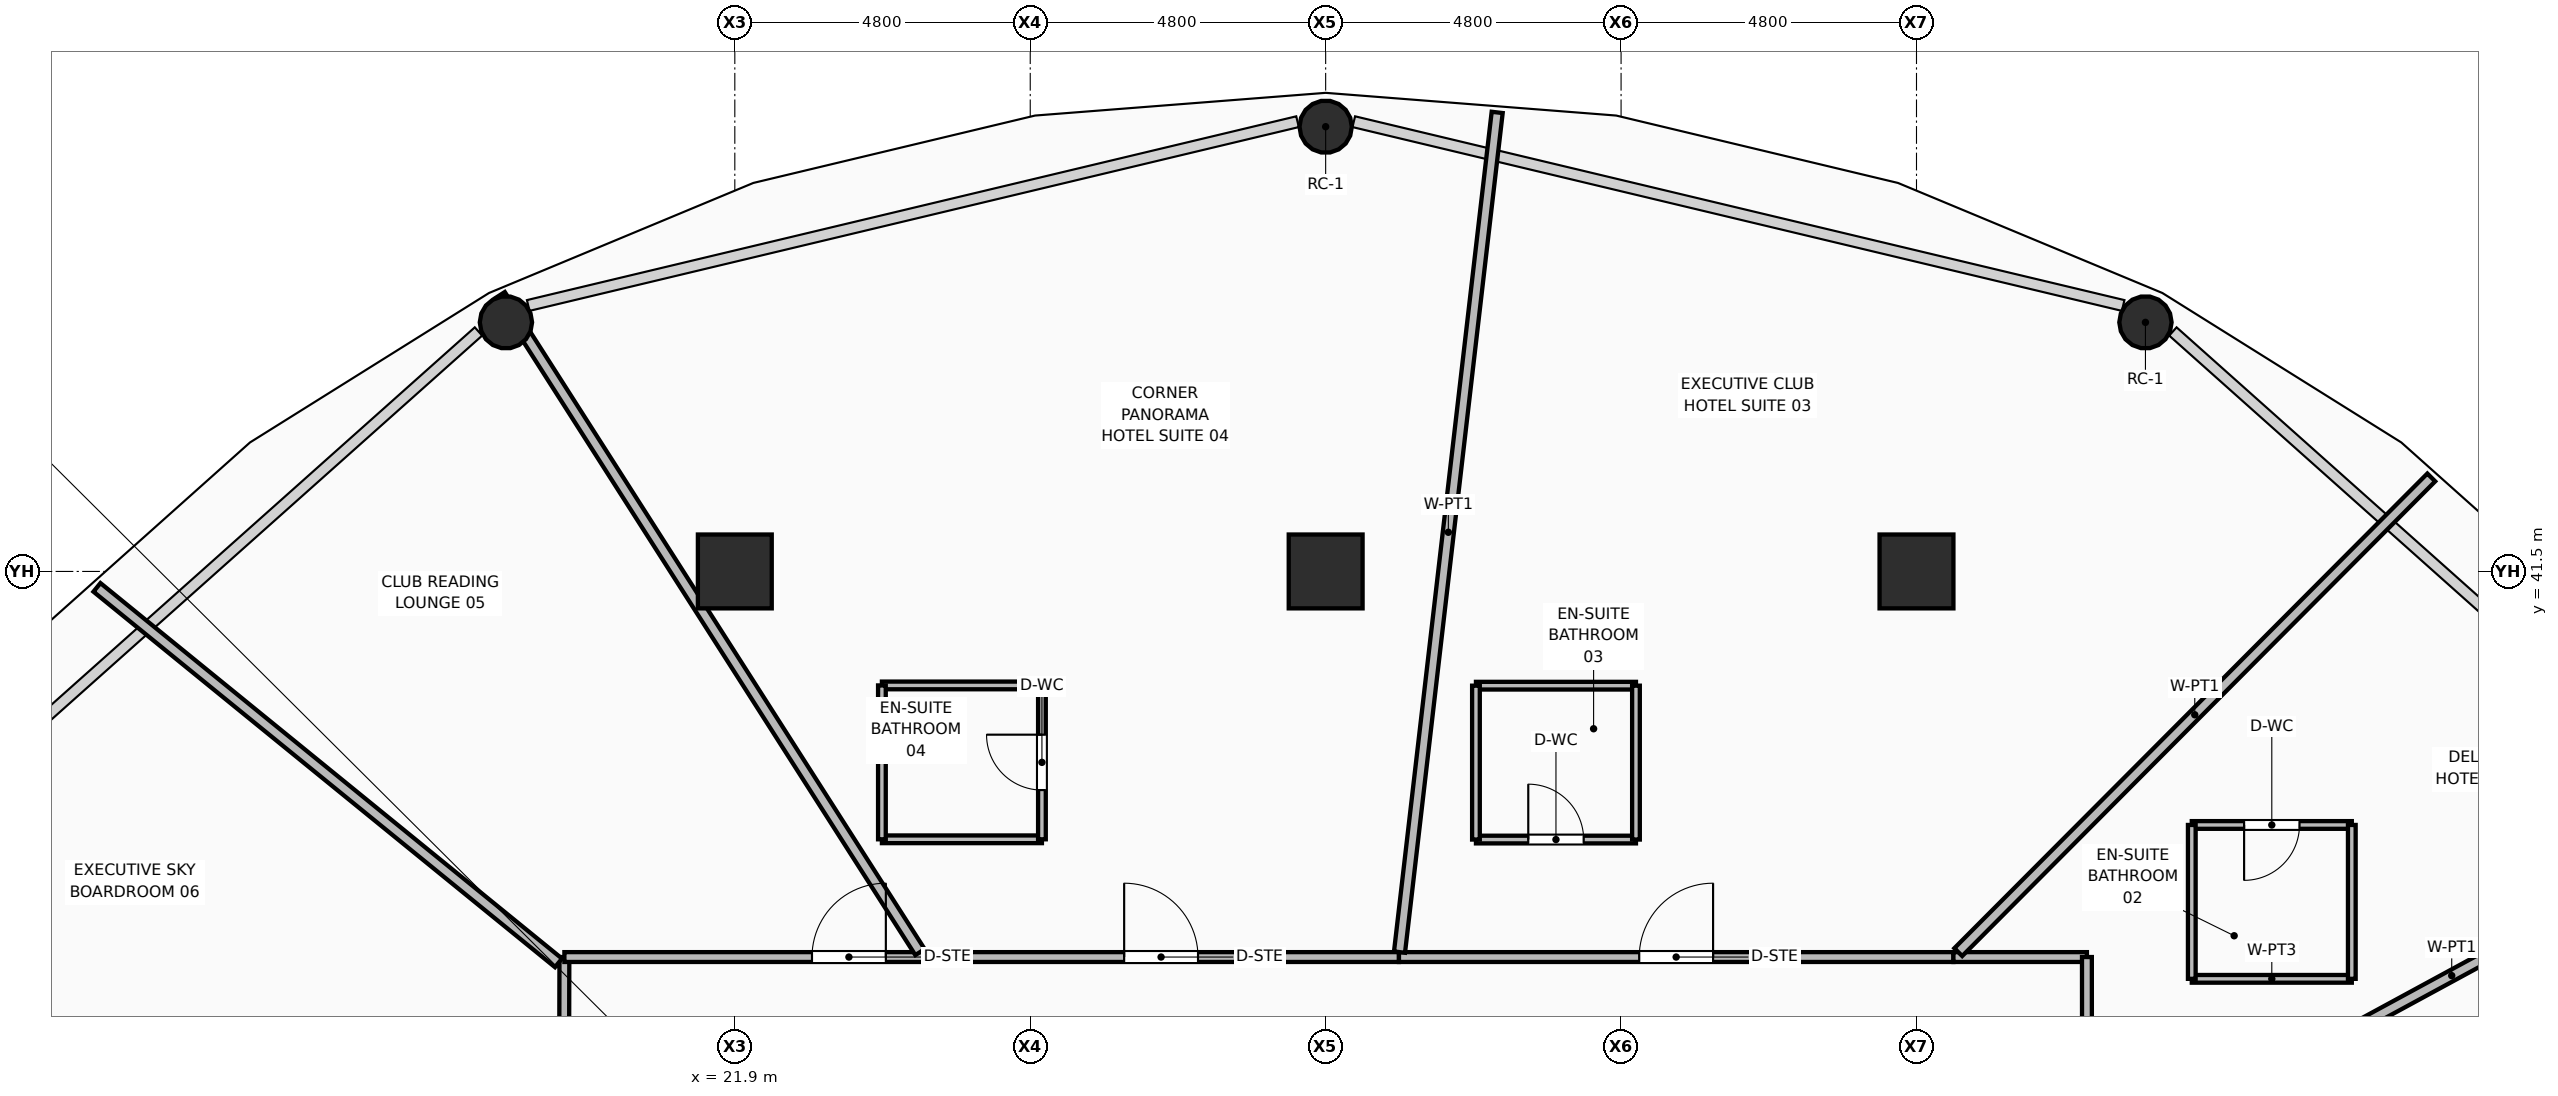
"""IFC4 building model, lengths in metres.
Left out: names, types, materials, properties, quantities, classifications, styles, units other than length and angle.
Written with IfcOpenShell. Run it as: python <this file> out.ifc"""

import sys

from ifc_helpers import new_model, si_unit, direction, frame, frame_2d, origin, origin_2d, place, context, subcontext, project, spatial, rectangle, hollow_rectangle, hollow_circle, extrude, element, fill, save


model = new_model("IFC4")
c1 = context("Model", 3, precision=1e-05, world=origin(), true_north=direction((0.0, 1.0)))
c2 = subcontext(c1, "Body", "Model", "MODEL_VIEW")
j1 = project(units=[si_unit("LENGTHUNIT", "METRE"), si_unit("PLANEANGLEUNIT", "RADIAN")], contexts=[c1])
p1 = place(None, origin())
s1 = spatial("IfcSite", under=j1, at=p1, CompositionType="ELEMENT")
p2 = place(p1, origin())
s2 = spatial("IfcBuilding", under=s1, at=p2, CompositionType="ELEMENT")
p3 = place(p2, frame((0.0, 0.0, 49.5)))
s3 = spatial("IfcBuildingStorey", under=s2, at=p3, CompositionType="ELEMENT", Elevation=49.5)
for number, where, z_axis, x_axis in (
    (1, (21.9, 41.5, 0.0), (0.0, 0.0, 1.0), (1.0, 0.0, 0.0)),
    (2, (31.5, 41.5, 0.0), (0.0, 0.0, 1.0), (1.0, 0.0, 0.0)),
    (3, (41.1, 41.5, 0.0), (0.0, 0.0, 1.0), (1.0, 0.0, 0.0)),
):
    element("IfcColumn", number, at=place(p3, frame(where, z_axis=z_axis, x_axis=x_axis)), inside=s3, PredefinedType="COLUMN", context=c2, shape_type="SweptSolid", body=[
        extrude(hollow_rectangle(XDim=1.2, YDim=1.2, WallThickness=0.045, at=origin_2d()), origin(), (0.0, 0.0, 1.0), 3.75),
    ])
for number, where, z_axis, x_axis in (
    (4, (44.82, 45.547, 0.0), (0.0, 0.0, 1.0), (1.0, 0.0, 0.0)),
    (5, (31.5, 48.726, 0.0), (0.0, 0.0, 1.0), (1.0, 0.0, 0.0)),
    (6, (18.181, 45.547, 0.0), (0.0, 0.0, 1.0), (1.0, 0.0, 0.0)),
):
    element("IfcColumn", number, at=place(p3, frame(where, z_axis=z_axis, x_axis=x_axis)), inside=s3, PredefinedType="COLUMN", context=c2, shape_type="SweptSolid", body=[
        extrude(hollow_circle(Radius=0.425, WallThickness=0.04, at=origin_2d()), origin(), (0.0, 0.0, 1.0), 3.57),
    ])
p4 = place(p3, frame((19.119, 29.98, 0.0), z_axis=(0.0, 0.0, 1.0), x_axis=(0.002322874105, 0.999997302124, 0.0)))
e7 = element("IfcWall", 7, at=p4, inside=s3, PredefinedType="PARTITIONING", context=c2, shape_type="SweptSolid", body=[
    extrude(rectangle(XDim=5.255, YDim=0.16, at=frame_2d((2.627, 0.0))), origin(), (0.0, 0.0, 1.0), 2.928),
])
p5 = place(p4, frame((0.608, 0.0, 0.0)))
e8 = element("IfcOpeningElement", 8, at=p5, cuts=e7, PredefinedType="OPENING", context=c2, shape_type="SweptSolid", body=[
    extrude(rectangle(XDim=1.2, YDim=2.1, at=frame_2d((0.6, 1.05))), frame((0.0, 0.09, 0.0), z_axis=(0.0, -1.0, 0.0), x_axis=(1.0, 0.0, 0.0)), (0.0, 0.0, 1.0), 0.18),
])
p6 = place(p3, frame((19.131, 35.235, 0.0), z_axis=(0.0, 0.0, 1.0), x_axis=(1.0, 0.0, 0.0)))
e9 = element("IfcWall", 9, at=p6, inside=s3, PredefinedType="PARTITIONING", context=c2, shape_type="SweptSolid", body=[
    extrude(rectangle(XDim=5.829, YDim=0.16, at=frame_2d((2.915, 0.0))), origin(), (0.0, 0.0, 1.0), 2.928),
])
p7 = place(p6, frame((4.023, 0.0, 0.0)))
e10 = element("IfcOpeningElement", 10, at=p7, cuts=e9, PredefinedType="OPENING", context=c2, shape_type="SweptSolid", body=[
    extrude(rectangle(XDim=1.2, YDim=2.1, at=frame_2d((0.6, 1.05))), frame((0.0, 0.09, 0.0), z_axis=(0.0, -1.0, 0.0), x_axis=(1.0, 0.0, 0.0)), (0.0, 0.0, 1.0), 0.18),
])
p8 = place(p3, frame((24.96, 35.235, 0.0), z_axis=(0.0, 0.0, 1.0), x_axis=(1.0, 0.0, 0.0)))
e11 = element("IfcWall", 11, at=p8, inside=s3, PredefinedType="PARTITIONING", context=c2, shape_type="SweptSolid", body=[
    extrude(rectangle(XDim=7.731, YDim=0.16, at=frame_2d((3.865, 0.0))), origin(), (0.0, 0.0, 1.0), 2.928),
])
p9 = place(p8, frame((3.266, 0.0, 0.0)))
e12 = element("IfcOpeningElement", 12, at=p9, cuts=e11, PredefinedType="OPENING", context=c2, shape_type="SweptSolid", body=[
    extrude(rectangle(XDim=1.2, YDim=2.1, at=frame_2d((0.6, 1.05))), frame((0.0, 0.09, 0.0), z_axis=(0.0, -1.0, 0.0), x_axis=(1.0, 0.0, 0.0)), (0.0, 0.0, 1.0), 0.18),
])
p10 = place(p3, frame((32.691, 35.235, 0.0), z_axis=(0.0, 0.0, 1.0), x_axis=(1.0, 0.0, 0.0)))
e13 = element("IfcWall", 13, at=p10, inside=s3, PredefinedType="PARTITIONING", context=c2, shape_type="SweptSolid", body=[
    extrude(rectangle(XDim=9.009, YDim=0.16, at=frame_2d((4.504, 0.0))), origin(), (0.0, 0.0, 1.0), 2.928),
])
p11 = place(p10, frame((3.904, 0.0, 0.0)))
e14 = element("IfcOpeningElement", 14, at=p11, cuts=e13, PredefinedType="OPENING", context=c2, shape_type="SweptSolid", body=[
    extrude(rectangle(XDim=1.2, YDim=2.1, at=frame_2d((0.6, 1.05))), frame((0.0, 0.09, 0.0), z_axis=(0.0, -1.0, 0.0), x_axis=(1.0, 0.0, 0.0)), (0.0, 0.0, 1.0), 0.18),
])
p12 = place(p3, frame((41.7, 35.235, 0.0), z_axis=(0.0, 0.0, 1.0), x_axis=(1.0, 0.0, 0.0)))
e15 = element("IfcWall", 15, at=p12, inside=s3, PredefinedType="PARTITIONING", context=c2, shape_type="SweptSolid", body=[
    extrude(rectangle(XDim=2.169, YDim=0.16, at=frame_2d((1.084, 0.0))), origin(), (0.0, 0.0, 1.0), 2.928),
])
p13 = place(p3, frame((43.869, 35.235, 0.0), z_axis=(0.0, 0.0, 1.0), x_axis=(0.00062439283, -0.999999805067, 0.0)))
e16 = element("IfcWall", 16, at=p13, inside=s3, PredefinedType="PARTITIONING", context=c2, shape_type="SweptSolid", body=[
    extrude(rectangle(XDim=3.519, YDim=0.16, at=frame_2d((1.76, 0.0))), origin(), (0.0, 0.0, 1.0), 2.928),
])
p14 = place(p13, frame((1.919, 0.0, 0.0)))
e17 = element("IfcOpeningElement", 17, at=p14, cuts=e16, PredefinedType="OPENING", context=c2, shape_type="SweptSolid", body=[
    extrude(rectangle(XDim=1.0, YDim=2.1, at=frame_2d((0.5, 1.05))), frame((0.0, 0.09, 0.0), z_axis=(0.0, -1.0, 0.0), x_axis=(1.0, 0.0, 0.0)), (0.0, 0.0, 1.0), 0.18),
])
p15 = place(p3, frame((43.965, 31.767, 0.0), z_axis=(0.0, 0.0, 1.0), x_axis=(0.878834340918, 0.477127028393, 0.0)))
e18 = element("IfcWall", 18, at=p15, inside=s3, PredefinedType="PARTITIONING", context=c2, shape_type="SweptSolid", body=[
    extrude(rectangle(XDim=12.104, YDim=0.18, at=frame_2d((6.052, 0.0))), origin(), (0.0, 0.0, 1.0), 2.775),
])
p16 = place(p3, frame((41.779, 35.315, 0.0), z_axis=(0.0, 0.0, 1.0), x_axis=(0.705861156653, 0.708350215309, 0.0)))
e19 = element("IfcWall", 19, at=p16, inside=s3, PredefinedType="PARTITIONING", context=c2, shape_type="SweptSolid", body=[
    extrude(rectangle(XDim=10.887, YDim=0.18, at=frame_2d((5.444, 0.0))), origin(), (0.0, 0.0, 1.0), 2.775),
])
p17 = place(p3, frame((32.7, 35.315, 0.0), z_axis=(0.0, 0.0, 1.0), x_axis=(0.115555102972, 0.993301071265, 0.0)))
e20 = element("IfcWall", 20, at=p17, inside=s3, PredefinedType="PARTITIONING", context=c2, shape_type="SweptSolid", body=[
    extrude(rectangle(XDim=13.735, YDim=0.18, at=frame_2d((6.868, 0.0))), origin(), (0.0, 0.0, 1.0), 2.775),
])
p18 = place(p3, frame((24.909, 35.315, 0.0), z_axis=(0.0, 0.0, 1.0), x_axis=(-0.538458076676, 0.842652300574, 0.0)))
e21 = element("IfcWall", 21, at=p18, inside=s3, PredefinedType="PARTITIONING", context=c2, shape_type="SweptSolid", body=[
    extrude(rectangle(XDim=12.669, YDim=0.18, at=frame_2d((6.335, 0.0))), origin(), (0.0, 0.0, 1.0), 2.775),
])
p19 = place(p3, frame((19.035, 35.14, 0.0), z_axis=(0.0, 0.0, 1.0), x_axis=(-0.77570287791, 0.631098284899, 0.0)))
e22 = element("IfcWall", 22, at=p19, inside=s3, PredefinedType="PARTITIONING", context=c2, shape_type="SweptSolid", body=[
    extrude(rectangle(XDim=9.667, YDim=0.18, at=frame_2d((4.834, 0.0))), origin(), (0.0, 0.0, 1.0), 2.775),
])
p20 = place(p3, frame((19.035, 30.014, 0.0), z_axis=(0.0, 0.0, 1.0), x_axis=(-0.927750435419, 0.373201191827, 0.0)))
e23 = element("IfcWall", 23, at=p20, inside=s3, PredefinedType="PARTITIONING", context=c2, shape_type="SweptSolid", body=[
    extrude(rectangle(XDim=13.084, YDim=0.18, at=frame_2d((6.542, 0.0))), origin(), (0.0, 0.0, 1.0), 2.775),
])
p21 = place(p3, frame((45.573, 34.881, 0.0), z_axis=(0.0, 0.0, 1.0), x_axis=(1.0, 0.0, 0.0)))
e24 = element("IfcWall", 24, at=p21, inside=s3, PredefinedType="PARTITIONING", context=c2, shape_type="SweptSolid", body=[
    extrude(rectangle(XDim=2.6, YDim=0.125, at=frame_2d((1.3, 0.0))), origin(), (0.0, 0.0, 1.0), 2.928),
])
p22 = place(p3, frame((45.573, 37.381, 0.0), z_axis=(0.0, 0.0, 1.0), x_axis=(1.0, 0.0, 0.0)))
e25 = element("IfcWall", 25, at=p22, inside=s3, PredefinedType="PARTITIONING", context=c2, shape_type="SweptSolid", body=[
    extrude(rectangle(XDim=2.6, YDim=0.125, at=frame_2d((1.3, 0.0))), origin(), (0.0, 0.0, 1.0), 3.55),
])
p23 = place(p22, frame((0.85, 0.0, 0.0)))
e26 = element("IfcOpeningElement", 26, at=p23, cuts=e25, PredefinedType="OPENING", context=c2, shape_type="SweptSolid", body=[
    extrude(rectangle(XDim=0.9, YDim=2.1, at=frame_2d((0.45, 1.05))), frame((0.0, 0.073, 0.0), z_axis=(0.0, -1.0, 0.0), x_axis=(1.0, 0.0, 0.0)), (0.0, 0.0, 1.0), 0.145),
])
p24 = place(p3, frame((45.573, 34.881, 0.0), z_axis=(0.0, 0.0, 1.0), x_axis=(0.0, 1.0, 0.0)))
e27 = element("IfcWall", 27, at=p24, inside=s3, PredefinedType="PARTITIONING", context=c2, shape_type="SweptSolid", body=[
    extrude(rectangle(XDim=2.5, YDim=0.125, at=frame_2d((1.25, 0.0))), origin(), (0.0, 0.0, 1.0), 3.55),
])
p25 = place(p3, frame((48.173, 34.881, 0.0), z_axis=(0.0, 0.0, 1.0), x_axis=(0.0, 1.0, 0.0)))
e28 = element("IfcWall", 28, at=p25, inside=s3, PredefinedType="PARTITIONING", context=c2, shape_type="SweptSolid", body=[
    extrude(rectangle(XDim=2.5, YDim=0.125, at=frame_2d((1.25, 0.0))), origin(), (0.0, 0.0, 1.0), 2.928),
])
p26 = place(p3, frame((33.942, 37.144, 0.0), z_axis=(0.0, 0.0, 1.0), x_axis=(1.0, 0.0, 0.0)))
e29 = element("IfcWall", 29, at=p26, inside=s3, PredefinedType="PARTITIONING", context=c2, shape_type="SweptSolid", body=[
    extrude(rectangle(XDim=2.6, YDim=0.125, at=frame_2d((1.3, 0.0))), origin(), (0.0, 0.0, 1.0), 3.55),
])
p27 = place(p26, frame((0.85, 0.0, 0.0)))
e30 = element("IfcOpeningElement", 30, at=p27, cuts=e29, PredefinedType="OPENING", context=c2, shape_type="SweptSolid", body=[
    extrude(rectangle(XDim=0.9, YDim=2.1, at=frame_2d((0.45, 1.05))), frame((0.0, 0.073, 0.0), z_axis=(0.0, -1.0, 0.0), x_axis=(1.0, 0.0, 0.0)), (0.0, 0.0, 1.0), 0.145),
])
p28 = place(p3, frame((33.942, 39.644, 0.0), z_axis=(0.0, 0.0, 1.0), x_axis=(1.0, 0.0, 0.0)))
e31 = element("IfcWall", 31, at=p28, inside=s3, PredefinedType="PARTITIONING", context=c2, shape_type="SweptSolid", body=[
    extrude(rectangle(XDim=2.6, YDim=0.125, at=frame_2d((1.3, 0.0))), origin(), (0.0, 0.0, 1.0), 3.55),
])
for number, where, z_axis, x_axis in (
    (32, (33.942, 37.144, 0.0), (0.0, 0.0, 1.0), (0.0, 1.0, 0.0)),
    (33, (36.542, 37.144, 0.0), (0.0, 0.0, 1.0), (0.0, 1.0, 0.0)),
):
    element("IfcWall", number, at=place(p3, frame(where, z_axis=z_axis, x_axis=x_axis)), inside=s3, PredefinedType="PARTITIONING", context=c2, shape_type="SweptSolid", body=[
        extrude(rectangle(XDim=2.5, YDim=0.125, at=frame_2d((1.25, 0.0))), origin(), (0.0, 0.0, 1.0), 3.55),
    ])
for number, where, z_axis, x_axis in (
    (34, (24.29, 37.148, 0.0), (0.0, 0.0, 1.0), (1.0, 0.0, 0.0)),
    (35, (24.29, 39.648, 0.0), (0.0, 0.0, 1.0), (1.0, 0.0, 0.0)),
):
    element("IfcWall", number, at=place(p3, frame(where, z_axis=z_axis, x_axis=x_axis)), inside=s3, PredefinedType="PARTITIONING", context=c2, shape_type="SweptSolid", body=[
        extrude(rectangle(XDim=2.6, YDim=0.125, at=frame_2d((1.3, 0.0))), origin(), (0.0, 0.0, 1.0), 3.55),
    ])
p29 = place(p3, frame((24.29, 37.148, 0.0), z_axis=(0.0, 0.0, 1.0), x_axis=(0.0, 1.0, 0.0)))
e36 = element("IfcWall", 36, at=p29, inside=s3, PredefinedType="PARTITIONING", context=c2, shape_type="SweptSolid", body=[
    extrude(rectangle(XDim=2.5, YDim=0.125, at=frame_2d((1.25, 0.0))), origin(), (0.0, 0.0, 1.0), 3.55),
])
p30 = place(p3, frame((26.89, 37.148, 0.0), z_axis=(0.0, 0.0, 1.0), x_axis=(0.0, 1.0, 0.0)))
e37 = element("IfcWall", 37, at=p30, inside=s3, PredefinedType="PARTITIONING", context=c2, shape_type="SweptSolid", body=[
    extrude(rectangle(XDim=2.5, YDim=0.125, at=frame_2d((1.25, 0.0))), origin(), (0.0, 0.0, 1.0), 3.55),
])
p31 = place(p30, frame((0.8, 0.0, 0.0)))
e38 = element("IfcOpeningElement", 38, at=p31, cuts=e37, PredefinedType="OPENING", context=c2, shape_type="SweptSolid", body=[
    extrude(rectangle(XDim=0.9, YDim=2.1, at=frame_2d((0.45, 1.05))), frame((0.0, 0.073, 0.0), z_axis=(0.0, -1.0, 0.0), x_axis=(1.0, 0.0, 0.0)), (0.0, 0.0, 1.0), 0.145),
])
p32 = place(p23, frame((0.9, 0.0, 0.0), z_axis=(0.0, 0.0, 1.0), x_axis=(-1.0, 0.0, 0.0)))
e39 = element("IfcDoor", 39, at=p32, inside=s3, OperationType="SINGLE_SWING_RIGHT", PredefinedType="DOOR", context=c2, shape_type="SweptSolid", body=[
    extrude(rectangle(XDim=0.9, YDim=2.1, at=frame_2d((0.45, 1.05))), frame((0.0, 0.025, 0.0), z_axis=(0.0, -1.0, 0.0), x_axis=(1.0, 0.0, 0.0)), (0.0, 0.0, 1.0), 0.05),
])
fill(e26, e39)
p33 = place(p27, origin())
e40 = element("IfcDoor", 40, at=p33, inside=s3, OperationType="SINGLE_SWING_LEFT", PredefinedType="DOOR", context=c2, shape_type="SweptSolid", body=[
    extrude(rectangle(XDim=0.9, YDim=2.1, at=frame_2d((0.45, 1.05))), frame((0.0, 0.025, 0.0), z_axis=(0.0, -1.0, 0.0), x_axis=(1.0, 0.0, 0.0)), (0.0, 0.0, 1.0), 0.05),
])
fill(e30, e40)
p34 = place(p11, origin())
e41 = element("IfcDoor", 41, at=p34, inside=s3, OperationType="SINGLE_SWING_RIGHT", PredefinedType="DOOR", context=c2, shape_type="SweptSolid", body=[
    extrude(rectangle(XDim=1.2, YDim=2.1, at=frame_2d((0.6, 1.05))), frame((0.0, 0.025, 0.0), z_axis=(0.0, -1.0, 0.0), x_axis=(1.0, 0.0, 0.0)), (0.0, 0.0, 1.0), 0.05),
])
fill(e14, e41)
p35 = place(p31, origin())
e42 = element("IfcDoor", 42, at=p35, inside=s3, OperationType="SINGLE_SWING_RIGHT", PredefinedType="DOOR", context=c2, shape_type="SweptSolid", body=[
    extrude(rectangle(XDim=0.9, YDim=2.1, at=frame_2d((0.45, 1.05))), frame((0.0, 0.025, 0.0), z_axis=(0.0, -1.0, 0.0), x_axis=(1.0, 0.0, 0.0)), (0.0, 0.0, 1.0), 0.05),
])
fill(e38, e42)
p36 = place(p9, origin())
e43 = element("IfcDoor", 43, at=p36, inside=s3, OperationType="SINGLE_SWING_LEFT", PredefinedType="DOOR", context=c2, shape_type="SweptSolid", body=[
    extrude(rectangle(XDim=1.2, YDim=2.1, at=frame_2d((0.6, 1.05))), frame((0.0, 0.025, 0.0), z_axis=(0.0, -1.0, 0.0), x_axis=(1.0, 0.0, 0.0)), (0.0, 0.0, 1.0), 0.05),
])
fill(e12, e43)
p37 = place(p7, origin())
e44 = element("IfcDoor", 44, at=p37, inside=s3, OperationType="SINGLE_SWING_RIGHT", PredefinedType="DOOR", context=c2, shape_type="SweptSolid", body=[
    extrude(rectangle(XDim=1.2, YDim=2.1, at=frame_2d((0.6, 1.05))), frame((0.0, 0.025, 0.0), z_axis=(0.0, -1.0, 0.0), x_axis=(1.0, 0.0, 0.0)), (0.0, 0.0, 1.0), 0.05),
])
fill(e10, e44)
save(model, sys.argv[1])
